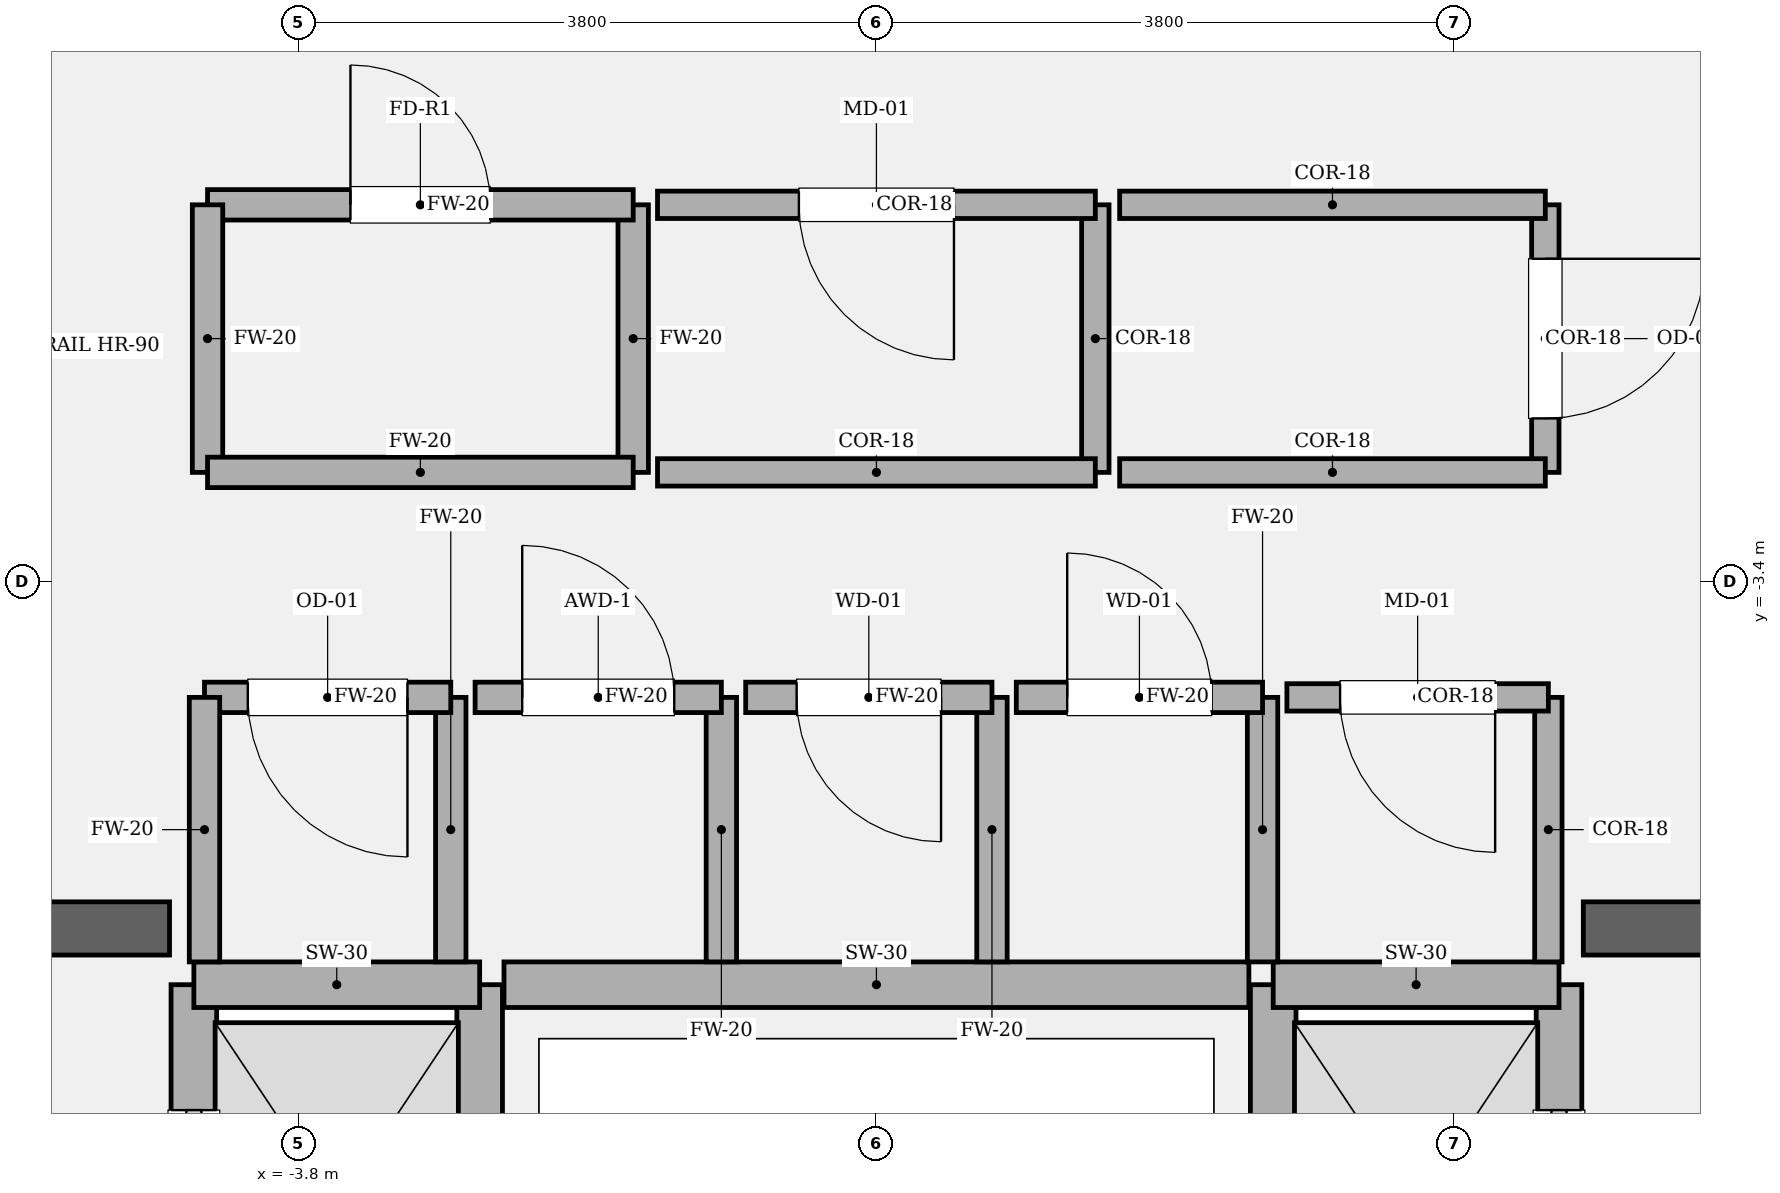
"""IFC4 building model, lengths in metres.
Left out: names, types, materials, properties, quantities, classifications, styles, units other than length and angle.
Written with IfcOpenShell. Run it as: python <this file> out.ifc"""

import sys

from ifc_helpers import new_model, si_unit, direction, frame, frame_2d, origin, place, context, subcontext, project, spatial, rectangle, extrude, element, fill, save


model = new_model("IFC4")
c1 = context("Model", 3, precision=1e-05, world=origin(), true_north=direction((0.0, 1.0)))
c2 = subcontext(c1, "Body", "Model", "MODEL_VIEW")
j1 = project(units=[si_unit("LENGTHUNIT", "METRE"), si_unit("PLANEANGLEUNIT", "RADIAN")], contexts=[c1])
p1 = place(None, origin())
s1 = spatial("IfcSite", under=j1, at=p1, CompositionType="ELEMENT")
p2 = place(p1, origin())
s2 = spatial("IfcBuilding", under=s1, at=p2, CompositionType="ELEMENT")
p3 = place(p2, frame((0.0, 0.0, 143.85)))
s3 = spatial("IfcBuildingStorey", under=s2, at=p3, CompositionType="ELEMENT", Elevation=143.85)
p4 = place(p3, frame((-9.875, -5.68, 0.0), z_axis=(0.0, 0.0, 1.0), x_axis=(1.0, 0.0, 0.0)))
e1 = element("IfcWall", 1, at=p4, inside=s3, PredefinedType="SOLIDWALL", context=c2, shape_type="SweptSolid", body=[
    extrude(rectangle(XDim=5.225, YDim=0.35, at=frame_2d((2.613, 0.0))), origin(), (0.0, 0.0, 1.0), 4.05),
])
p5 = place(p4, frame((1.335, 0.0, 0.0)))
e2 = element("IfcOpeningElement", 2, at=p5, cuts=e1, PredefinedType="OPENING", context=c2, shape_type="SweptSolid", body=[
    extrude(rectangle(XDim=1.18, YDim=2.2, at=frame_2d((0.59, 1.1))), frame((0.0, 0.185, 0.0), z_axis=(0.0, -1.0, 0.0), x_axis=(1.0, 0.0, 0.0)), (0.0, 0.0, 1.0), 0.37),
])
p6 = place(p3, frame((4.65, -5.68, 0.0), z_axis=(0.0, 0.0, 1.0), x_axis=(1.0, 0.0, 0.0)))
e3 = element("IfcWall", 3, at=p6, inside=s3, PredefinedType="SOLIDWALL", context=c2, shape_type="SweptSolid", body=[
    extrude(rectangle(XDim=5.225, YDim=0.35, at=frame_2d((2.613, 0.0))), origin(), (0.0, 0.0, 1.0), 4.05),
])
p7 = place(p6, frame((2.71, 0.0, 0.0)))
e4 = element("IfcOpeningElement", 4, at=p7, cuts=e3, PredefinedType="OPENING", context=c2, shape_type="SweptSolid", body=[
    extrude(rectangle(XDim=1.18, YDim=2.2, at=frame_2d((0.59, 1.1))), frame((0.0, 0.185, 0.0), z_axis=(0.0, -1.0, 0.0), x_axis=(1.0, 0.0, 0.0)), (0.0, 0.0, 1.0), 0.37),
])
p8 = place(p3, frame((-4.49, -8.82, 0.0), z_axis=(0.0, 0.0, 1.0), x_axis=(0.0, 1.0, 0.0)))
e5 = element("IfcWall", 5, at=p8, inside=s3, PredefinedType="SOLIDWALL", context=c2, shape_type="SweptSolid", body=[
    extrude(rectangle(XDim=2.77, YDim=0.3, at=frame_2d((1.385, 0.0))), origin(), (0.0, 0.0, 1.0), 3.83),
])
p9 = place(p8, frame((0.825, 0.0, 0.0)))
e6 = element("IfcOpeningElement", 6, at=p9, cuts=e5, PredefinedType="OPENING", context=c2, shape_type="SweptSolid", body=[
    extrude(rectangle(XDim=1.12, YDim=2.25, at=frame_2d((0.56, 1.125))), frame((0.0, 0.16, 0.0), z_axis=(0.0, -1.0, 0.0), x_axis=(1.0, 0.0, 0.0)), (0.0, 0.0, 1.0), 0.32),
])
p10 = place(p3, frame((-2.61, -8.82, 0.0), z_axis=(0.0, 0.0, 1.0), x_axis=(0.0, 1.0, 0.0)))
e7 = element("IfcWall", 7, at=p10, inside=s3, PredefinedType="SOLIDWALL", context=c2, shape_type="SweptSolid", body=[
    extrude(rectangle(XDim=2.77, YDim=0.3, at=frame_2d((1.385, 0.0))), origin(), (0.0, 0.0, 1.0), 3.83),
])
p11 = place(p3, frame((-4.49, -6.05, 0.0), z_axis=(0.0, 0.0, 1.0), x_axis=(1.0, 0.0, 0.0)))
e8 = element("IfcWall", 8, at=p11, inside=s3, PredefinedType="SOLIDWALL", context=c2, shape_type="SweptSolid", body=[
    extrude(rectangle(XDim=1.88, YDim=0.3, at=frame_2d((0.94, 0.0))), origin(), (0.0, 0.0, 1.0), 3.83),
])
p12 = place(p3, frame((4.49, -8.82, 0.0), z_axis=(0.0, 0.0, 1.0), x_axis=(0.0, 1.0, 0.0)))
e9 = element("IfcWall", 9, at=p12, inside=s3, PredefinedType="SOLIDWALL", context=c2, shape_type="SweptSolid", body=[
    extrude(rectangle(XDim=2.77, YDim=0.3, at=frame_2d((1.385, 0.0))), origin(), (0.0, 0.0, 1.0), 3.83),
])
p13 = place(p12, frame((0.825, 0.0, 0.0)))
e10 = element("IfcOpeningElement", 10, at=p13, cuts=e9, PredefinedType="OPENING", context=c2, shape_type="SweptSolid", body=[
    extrude(rectangle(XDim=1.12, YDim=2.25, at=frame_2d((0.56, 1.125))), frame((0.0, 0.16, 0.0), z_axis=(0.0, -1.0, 0.0), x_axis=(1.0, 0.0, 0.0)), (0.0, 0.0, 1.0), 0.32),
])
p14 = place(p3, frame((2.61, -8.82, 0.0), z_axis=(0.0, 0.0, 1.0), x_axis=(0.0, 1.0, 0.0)))
e11 = element("IfcWall", 11, at=p14, inside=s3, PredefinedType="SOLIDWALL", context=c2, shape_type="SweptSolid", body=[
    extrude(rectangle(XDim=2.77, YDim=0.3, at=frame_2d((1.385, 0.0))), origin(), (0.0, 0.0, 1.0), 3.83),
])
p15 = place(p3, frame((2.61, -6.05, 0.0), z_axis=(0.0, 0.0, 1.0), x_axis=(1.0, 0.0, 0.0)))
e12 = element("IfcWall", 12, at=p15, inside=s3, PredefinedType="SOLIDWALL", context=c2, shape_type="SweptSolid", body=[
    extrude(rectangle(XDim=1.88, YDim=0.3, at=frame_2d((0.94, 0.0))), origin(), (0.0, 0.0, 1.0), 3.83),
])
p16 = place(p3, frame((-2.45, -6.05, 0.0), z_axis=(0.0, 0.0, 1.0), x_axis=(1.0, 0.0, 0.0)))
e13 = element("IfcWall", 13, at=p16, inside=s3, PredefinedType="SOLIDWALL", context=c2, shape_type="SweptSolid", body=[
    extrude(rectangle(XDim=4.9, YDim=0.3, at=frame_2d((2.45, 0.0))), origin(), (0.0, 0.0, 1.0), 3.83),
])
p17 = place(p3, frame((-2.8, -5.9, 0.0), z_axis=(0.0, 0.0, 1.0), x_axis=(0.0, 1.0, 0.0)))
e14 = element("IfcWall", 14, at=p17, inside=s3, PredefinedType="SOLIDWALL", context=c2, shape_type="SweptSolid", body=[
    extrude(rectangle(XDim=1.74, YDim=0.2, at=frame_2d((0.87, 0.0))), origin(), (0.0, 0.0, 1.0), 3.83),
])
p18 = place(p3, frame((-2.8, -4.16, 0.0), z_axis=(0.0, 0.0, 1.0), x_axis=(-1.0, 0.0, 0.0)))
e15 = element("IfcWall", 15, at=p18, inside=s3, PredefinedType="SOLIDWALL", context=c2, shape_type="SweptSolid", body=[
    extrude(rectangle(XDim=1.62, YDim=0.2, at=frame_2d((0.81, 0.0))), origin(), (0.0, 0.0, 1.0), 3.83),
])
p19 = place(p18, frame((0.285, 0.0, 0.0)))
e16 = element("IfcOpeningElement", 16, at=p19, cuts=e15, PredefinedType="OPENING", context=c2, shape_type="SweptSolid", body=[
    extrude(rectangle(XDim=1.05, YDim=2.2, at=frame_2d((0.525, 1.1))), frame((0.0, 0.11, 0.0), z_axis=(0.0, -1.0, 0.0), x_axis=(1.0, 0.0, 0.0)), (0.0, 0.0, 1.0), 0.22),
])
for number, where, z_axis, x_axis in (
    (17, (-4.42, -4.16, 0.0), (0.0, 0.0, 1.0), (0.0, -1.0, 0.0)),
    (18, (-1.02, -5.9, 0.0), (0.0, 0.0, 1.0), (0.0, 1.0, 0.0)),
):
    element("IfcWall", number, at=place(p3, frame(where, z_axis=z_axis, x_axis=x_axis)), inside=s3, PredefinedType="SOLIDWALL", context=c2, shape_type="SweptSolid", body=[
        extrude(rectangle(XDim=1.74, YDim=0.2, at=frame_2d((0.87, 0.0))), origin(), (0.0, 0.0, 1.0), 3.83),
    ])
p20 = place(p3, frame((-1.02, -4.16, 0.0), z_axis=(0.0, 0.0, 1.0), x_axis=(-1.0, 0.0, 0.0)))
e19 = element("IfcWall", 19, at=p20, inside=s3, PredefinedType="SOLIDWALL", context=c2, shape_type="SweptSolid", body=[
    extrude(rectangle(XDim=1.62, YDim=0.2, at=frame_2d((0.81, 0.0))), origin(), (0.0, 0.0, 1.0), 3.83),
])
p21 = place(p20, frame((0.31, 0.0, 0.0)))
e20 = element("IfcOpeningElement", 20, at=p21, cuts=e19, PredefinedType="OPENING", context=c2, shape_type="SweptSolid", body=[
    extrude(rectangle(XDim=1.0, YDim=2.15, at=frame_2d((0.5, 1.075))), frame((0.0, 0.11, 0.0), z_axis=(0.0, -1.0, 0.0), x_axis=(1.0, 0.0, 0.0)), (0.0, 0.0, 1.0), 0.22),
])
p22 = place(p3, frame((0.76, -5.9, 0.0), z_axis=(0.0, 0.0, 1.0), x_axis=(0.0, 1.0, 0.0)))
e21 = element("IfcWall", 21, at=p22, inside=s3, PredefinedType="SOLIDWALL", context=c2, shape_type="SweptSolid", body=[
    extrude(rectangle(XDim=1.74, YDim=0.2, at=frame_2d((0.87, 0.0))), origin(), (0.0, 0.0, 1.0), 3.83),
])
p23 = place(p3, frame((0.76, -4.16, 0.0), z_axis=(0.0, 0.0, 1.0), x_axis=(-1.0, 0.0, 0.0)))
e22 = element("IfcWall", 22, at=p23, inside=s3, PredefinedType="SOLIDWALL", context=c2, shape_type="SweptSolid", body=[
    extrude(rectangle(XDim=1.62, YDim=0.2, at=frame_2d((0.81, 0.0))), origin(), (0.0, 0.0, 1.0), 3.83),
])
p24 = place(p23, frame((0.335, 0.0, 0.0)))
e23 = element("IfcOpeningElement", 23, at=p24, cuts=e22, PredefinedType="OPENING", context=c2, shape_type="SweptSolid", body=[
    extrude(rectangle(XDim=0.95, YDim=2.15, at=frame_2d((0.475, 1.075))), frame((0.0, 0.11, 0.0), z_axis=(0.0, -1.0, 0.0), x_axis=(1.0, 0.0, 0.0)), (0.0, 0.0, 1.0), 0.22),
])
p25 = place(p3, frame((2.54, -5.9, 0.0), z_axis=(0.0, 0.0, 1.0), x_axis=(0.0, 1.0, 0.0)))
e24 = element("IfcWall", 24, at=p25, inside=s3, PredefinedType="SOLIDWALL", context=c2, shape_type="SweptSolid", body=[
    extrude(rectangle(XDim=1.74, YDim=0.2, at=frame_2d((0.87, 0.0))), origin(), (0.0, 0.0, 1.0), 3.83),
])
p26 = place(p3, frame((2.54, -4.16, 0.0), z_axis=(0.0, 0.0, 1.0), x_axis=(-1.0, 0.0, 0.0)))
e25 = element("IfcWall", 25, at=p26, inside=s3, PredefinedType="SOLIDWALL", context=c2, shape_type="SweptSolid", body=[
    extrude(rectangle(XDim=1.62, YDim=0.2, at=frame_2d((0.81, 0.0))), origin(), (0.0, 0.0, 1.0), 3.83),
])
p27 = place(p26, frame((0.335, 0.0, 0.0)))
e26 = element("IfcOpeningElement", 26, at=p27, cuts=e25, PredefinedType="OPENING", context=c2, shape_type="SweptSolid", body=[
    extrude(rectangle(XDim=0.95, YDim=2.15, at=frame_2d((0.475, 1.075))), frame((0.0, 0.11, 0.0), z_axis=(0.0, -1.0, 0.0), x_axis=(1.0, 0.0, 0.0)), (0.0, 0.0, 1.0), 0.22),
])
p28 = place(p3, frame((4.42, -5.9, 0.0), z_axis=(0.0, 0.0, 1.0), x_axis=(0.0, 1.0, 0.0)))
e27 = element("IfcWall", 27, at=p28, inside=s3, PredefinedType="PARTITIONING", context=c2, shape_type="SweptSolid", body=[
    extrude(rectangle(XDim=1.74, YDim=0.18, at=frame_2d((0.87, 0.0))), origin(), (0.0, 0.0, 1.0), 3.83),
])
p29 = place(p3, frame((4.42, -4.16, 0.0), z_axis=(0.0, 0.0, 1.0), x_axis=(-1.0, 0.0, 0.0)))
e28 = element("IfcWall", 28, at=p29, inside=s3, PredefinedType="PARTITIONING", context=c2, shape_type="SweptSolid", body=[
    extrude(rectangle(XDim=1.72, YDim=0.18, at=frame_2d((0.86, 0.0))), origin(), (0.0, 0.0, 1.0), 3.83),
])
p30 = place(p29, frame((0.35, 0.0, 0.0)))
e29 = element("IfcOpeningElement", 29, at=p30, cuts=e28, PredefinedType="OPENING", context=c2, shape_type="SweptSolid", body=[
    extrude(rectangle(XDim=1.02, YDim=2.2, at=frame_2d((0.51, 1.1))), frame((0.0, 0.1, 0.0), z_axis=(0.0, -1.0, 0.0), x_axis=(1.0, 0.0, 0.0)), (0.0, 0.0, 1.0), 0.2),
])
p31 = place(p3, frame((-1.6, -2.68, 0.0), z_axis=(0.0, 0.0, 1.0), x_axis=(0.0, 1.0, 0.0)))
e30 = element("IfcWall", 30, at=p31, inside=s3, PredefinedType="SOLIDWALL", context=c2, shape_type="SweptSolid", body=[
    extrude(rectangle(XDim=1.76, YDim=0.2, at=frame_2d((0.88, 0.0))), origin(), (0.0, 0.0, 1.0), 3.83),
])
p32 = place(p3, frame((-1.6, -0.92, 0.0), z_axis=(0.0, 0.0, 1.0), x_axis=(-1.0, 0.0, 0.0)))
e31 = element("IfcWall", 31, at=p32, inside=s3, PredefinedType="SOLIDWALL", context=c2, shape_type="SweptSolid", body=[
    extrude(rectangle(XDim=2.8, YDim=0.2, at=frame_2d((1.4, 0.0))), origin(), (0.0, 0.0, 1.0), 3.83),
])
p33 = place(p32, frame((0.94, 0.0, 0.0)))
e32 = element("IfcOpeningElement", 32, at=p33, cuts=e31, PredefinedType="OPENING", context=c2, shape_type="SweptSolid", body=[
    extrude(rectangle(XDim=0.92, YDim=2.1, at=frame_2d((0.46, 1.05))), frame((0.0, 0.11, 0.0), z_axis=(0.0, -1.0, 0.0), x_axis=(1.0, 0.0, 0.0)), (0.0, 0.0, 1.0), 0.22),
])
p34 = place(p3, frame((-4.4, -0.92, 0.0), z_axis=(0.0, 0.0, 1.0), x_axis=(0.0, -1.0, 0.0)))
e33 = element("IfcWall", 33, at=p34, inside=s3, PredefinedType="SOLIDWALL", context=c2, shape_type="SweptSolid", body=[
    extrude(rectangle(XDim=1.76, YDim=0.2, at=frame_2d((0.88, 0.0))), origin(), (0.0, 0.0, 1.0), 3.83),
])
p35 = place(p3, frame((-4.4, -2.68, 0.0), z_axis=(0.0, 0.0, 1.0), x_axis=(1.0, 0.0, 0.0)))
e34 = element("IfcWall", 34, at=p35, inside=s3, PredefinedType="SOLIDWALL", context=c2, shape_type="SweptSolid", body=[
    extrude(rectangle(XDim=2.8, YDim=0.2, at=frame_2d((1.4, 0.0))), origin(), (0.0, 0.0, 1.0), 3.83),
])
p36 = place(p3, frame((1.44, -2.68, 0.0), z_axis=(0.0, 0.0, 1.0), x_axis=(0.0, 1.0, 0.0)))
e35 = element("IfcWall", 35, at=p36, inside=s3, PredefinedType="PARTITIONING", context=c2, shape_type="SweptSolid", body=[
    extrude(rectangle(XDim=1.76, YDim=0.18, at=frame_2d((0.88, 0.0))), origin(), (0.0, 0.0, 1.0), 3.83),
])
p37 = place(p3, frame((1.44, -0.92, 0.0), z_axis=(0.0, 0.0, 1.0), x_axis=(-1.0, 0.0, 0.0)))
e36 = element("IfcWall", 36, at=p37, inside=s3, PredefinedType="PARTITIONING", context=c2, shape_type="SweptSolid", body=[
    extrude(rectangle(XDim=2.88, YDim=0.18, at=frame_2d((1.44, 0.0))), origin(), (0.0, 0.0, 1.0), 3.83),
])
p38 = place(p37, frame((0.93, 0.0, 0.0)))
e37 = element("IfcOpeningElement", 37, at=p38, cuts=e36, PredefinedType="OPENING", context=c2, shape_type="SweptSolid", body=[
    extrude(rectangle(XDim=1.02, YDim=2.2, at=frame_2d((0.51, 1.1))), frame((0.0, 0.1, 0.0), z_axis=(0.0, -1.0, 0.0), x_axis=(1.0, 0.0, 0.0)), (0.0, 0.0, 1.0), 0.2),
])
p39 = place(p3, frame((-1.44, -2.68, 0.0), z_axis=(0.0, 0.0, 1.0), x_axis=(1.0, 0.0, 0.0)))
e38 = element("IfcWall", 38, at=p39, inside=s3, PredefinedType="PARTITIONING", context=c2, shape_type="SweptSolid", body=[
    extrude(rectangle(XDim=2.88, YDim=0.18, at=frame_2d((1.44, 0.0))), origin(), (0.0, 0.0, 1.0), 3.83),
])
p40 = place(p3, frame((4.4, -2.68, 0.0), z_axis=(0.0, 0.0, 1.0), x_axis=(0.0, 1.0, 0.0)))
e39 = element("IfcWall", 39, at=p40, inside=s3, PredefinedType="PARTITIONING", context=c2, shape_type="SweptSolid", body=[
    extrude(rectangle(XDim=1.76, YDim=0.18, at=frame_2d((0.88, 0.0))), origin(), (0.0, 0.0, 1.0), 3.83),
])
p41 = place(p40, frame((0.355, 0.0, 0.0)))
e40 = element("IfcOpeningElement", 40, at=p41, cuts=e39, PredefinedType="OPENING", context=c2, shape_type="SweptSolid", body=[
    extrude(rectangle(XDim=1.05, YDim=2.2, at=frame_2d((0.525, 1.1))), frame((0.0, 0.1, 0.0), z_axis=(0.0, -1.0, 0.0), x_axis=(1.0, 0.0, 0.0)), (0.0, 0.0, 1.0), 0.2),
])
for number, where, z_axis, x_axis in (
    (41, (4.4, -0.92, 0.0), (0.0, 0.0, 1.0), (-1.0, 0.0, 0.0)),
    (42, (1.6, -2.68, 0.0), (0.0, 0.0, 1.0), (1.0, 0.0, 0.0)),
):
    element("IfcWall", number, at=place(p3, frame(where, z_axis=z_axis, x_axis=x_axis)), inside=s3, PredefinedType="PARTITIONING", context=c2, shape_type="SweptSolid", body=[
        extrude(rectangle(XDim=2.8, YDim=0.18, at=frame_2d((1.4, 0.0))), origin(), (0.0, 0.0, 1.0), 3.83),
    ])
p42 = place(p9, origin())
e43 = element("IfcDoor", 43, at=p42, inside=s3, OperationType="SLIDING_TO_LEFT", PredefinedType="DOOR", context=c2, shape_type="SweptSolid", body=[
    extrude(rectangle(XDim=1.12, YDim=2.25, at=frame_2d((0.56, 1.125))), frame((0.0, 0.025, 0.0), z_axis=(0.0, -1.0, 0.0), x_axis=(1.0, 0.0, 0.0)), (0.0, 0.0, 1.0), 0.05),
])
fill(e6, e43)
p43 = place(p13, origin())
e44 = element("IfcDoor", 44, at=p43, inside=s3, OperationType="SLIDING_TO_RIGHT", PredefinedType="DOOR", context=c2, shape_type="SweptSolid", body=[
    extrude(rectangle(XDim=1.12, YDim=2.25, at=frame_2d((0.56, 1.125))), frame((0.0, 0.025, 0.0), z_axis=(0.0, -1.0, 0.0), x_axis=(1.0, 0.0, 0.0)), (0.0, 0.0, 1.0), 0.05),
])
fill(e10, e44)
p44 = place(p19, origin())
e45 = element("IfcDoor", 45, at=p44, inside=s3, OperationType="SINGLE_SWING_LEFT", PredefinedType="DOOR", context=c2, shape_type="SweptSolid", body=[
    extrude(rectangle(XDim=1.05, YDim=2.2, at=frame_2d((0.525, 1.1))), frame((0.0, 0.025, 0.0), z_axis=(0.0, -1.0, 0.0), x_axis=(1.0, 0.0, 0.0)), (0.0, 0.0, 1.0), 0.05),
])
fill(e16, e45)
p45 = place(p21, origin())
e46 = element("IfcDoor", 46, at=p45, inside=s3, OperationType="SINGLE_SWING_RIGHT", PredefinedType="DOOR", context=c2, shape_type="SweptSolid", body=[
    extrude(rectangle(XDim=1.0, YDim=2.15, at=frame_2d((0.5, 1.075))), frame((0.0, 0.025, 0.0), z_axis=(0.0, -1.0, 0.0), x_axis=(1.0, 0.0, 0.0)), (0.0, 0.0, 1.0), 0.05),
])
fill(e20, e46)
p46 = place(p24, origin())
e47 = element("IfcDoor", 47, at=p46, inside=s3, OperationType="SINGLE_SWING_LEFT", PredefinedType="DOOR", context=c2, shape_type="SweptSolid", body=[
    extrude(rectangle(XDim=0.95, YDim=2.15, at=frame_2d((0.475, 1.075))), frame((0.0, 0.025, 0.0), z_axis=(0.0, -1.0, 0.0), x_axis=(1.0, 0.0, 0.0)), (0.0, 0.0, 1.0), 0.05),
])
fill(e23, e47)
p47 = place(p27, origin())
e48 = element("IfcDoor", 48, at=p47, inside=s3, OperationType="SINGLE_SWING_RIGHT", PredefinedType="DOOR", context=c2, shape_type="SweptSolid", body=[
    extrude(rectangle(XDim=0.95, YDim=2.15, at=frame_2d((0.475, 1.075))), frame((0.0, 0.025, 0.0), z_axis=(0.0, -1.0, 0.0), x_axis=(1.0, 0.0, 0.0)), (0.0, 0.0, 1.0), 0.05),
])
fill(e26, e48)
p48 = place(p30, origin())
e49 = element("IfcDoor", 49, at=p48, inside=s3, OperationType="SINGLE_SWING_LEFT", PredefinedType="DOOR", context=c2, shape_type="SweptSolid", body=[
    extrude(rectangle(XDim=1.02, YDim=2.2, at=frame_2d((0.51, 1.1))), frame((0.0, 0.025, 0.0), z_axis=(0.0, -1.0, 0.0), x_axis=(1.0, 0.0, 0.0)), (0.0, 0.0, 1.0), 0.05),
])
fill(e29, e49)
p49 = place(p33, origin())
e50 = element("IfcDoor", 50, at=p49, inside=s3, OperationType="SINGLE_SWING_RIGHT", PredefinedType="DOOR", context=c2, shape_type="SweptSolid", body=[
    extrude(rectangle(XDim=0.92, YDim=2.1, at=frame_2d((0.46, 1.05))), frame((0.0, 0.025, 0.0), z_axis=(0.0, -1.0, 0.0), x_axis=(1.0, 0.0, 0.0)), (0.0, 0.0, 1.0), 0.05),
])
fill(e32, e50)
p50 = place(p38, origin())
e51 = element("IfcDoor", 51, at=p50, inside=s3, OperationType="SINGLE_SWING_LEFT", PredefinedType="DOOR", context=c2, shape_type="SweptSolid", body=[
    extrude(rectangle(XDim=1.02, YDim=2.2, at=frame_2d((0.51, 1.1))), frame((0.0, 0.025, 0.0), z_axis=(0.0, -1.0, 0.0), x_axis=(1.0, 0.0, 0.0)), (0.0, 0.0, 1.0), 0.05),
])
fill(e37, e51)
p51 = place(p41, origin())
e52 = element("IfcDoor", 52, at=p51, inside=s3, OperationType="SINGLE_SWING_RIGHT", PredefinedType="DOOR", context=c2, shape_type="SweptSolid", body=[
    extrude(rectangle(XDim=1.05, YDim=2.2, at=frame_2d((0.525, 1.1))), frame((0.0, 0.025, 0.0), z_axis=(0.0, -1.0, 0.0), x_axis=(1.0, 0.0, 0.0)), (0.0, 0.0, 1.0), 0.05),
])
fill(e40, e52)
save(model, sys.argv[1])
